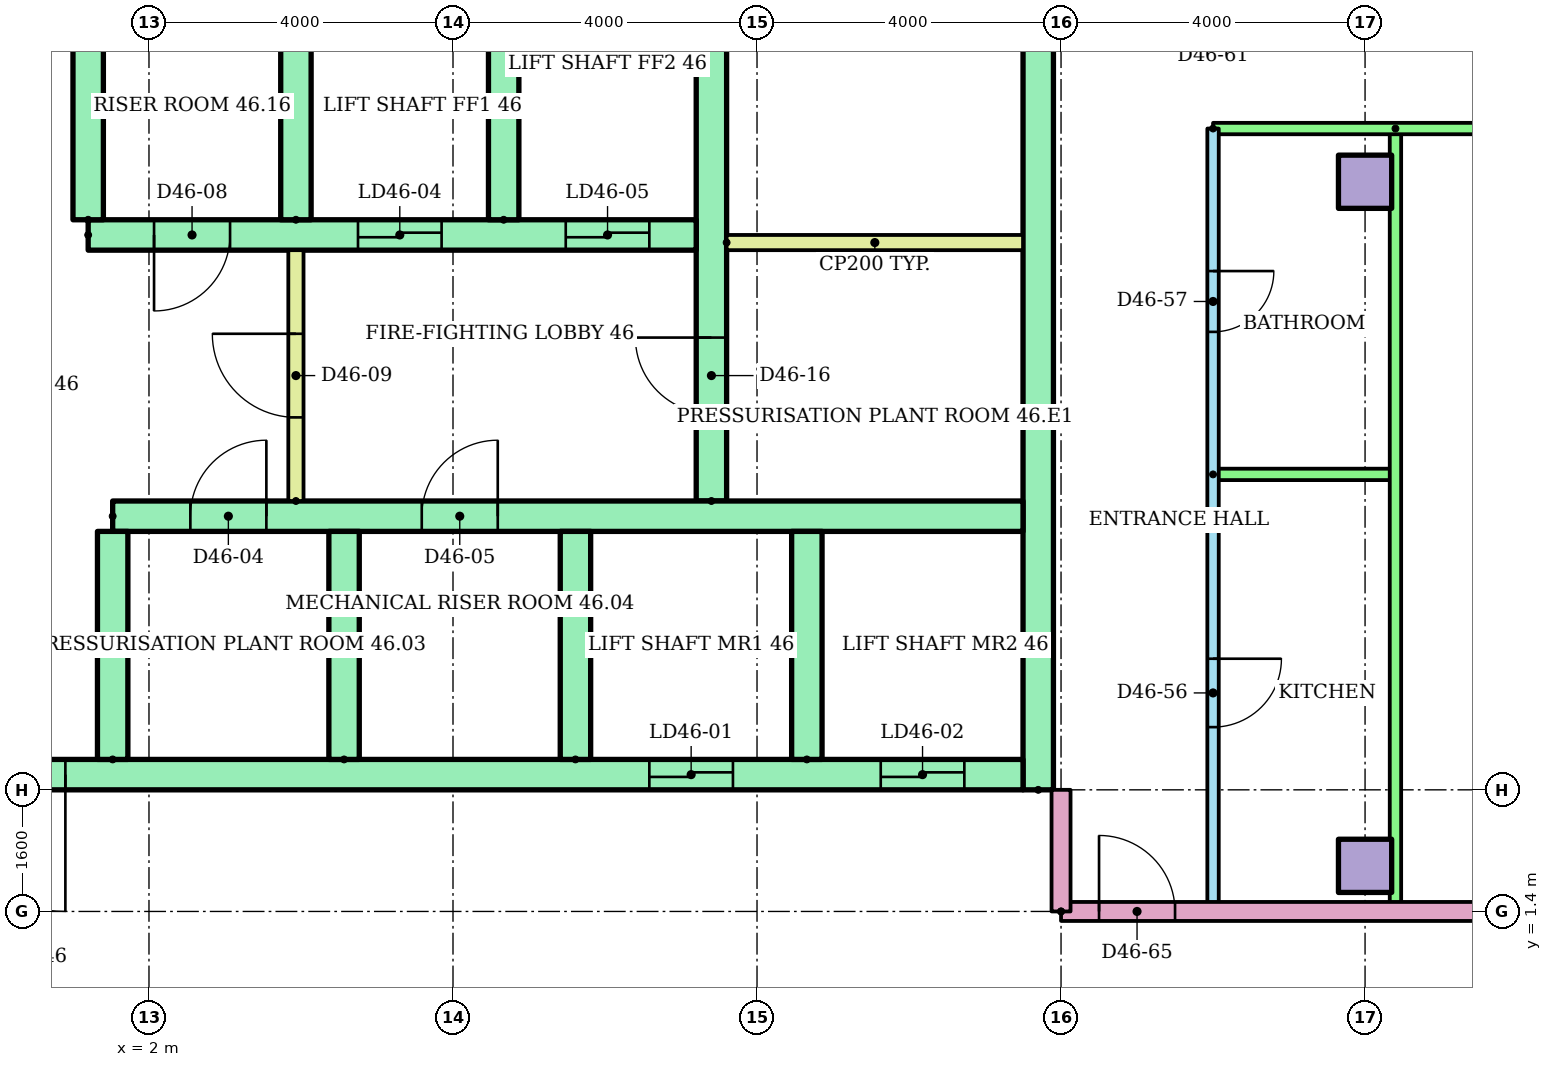
"""IFC4 building model, lengths in metres.
Left out: names, types, materials, properties, quantities, classifications, styles, units other than length and angle.
Written with IfcOpenShell. Run it as: python <this file> out.ifc"""

import sys

from ifc_helpers import new_model, si_unit, direction, frame, frame_2d, origin, origin_2d, place, context, subcontext, project, spatial, rectangle, extrude, element, fill, save


model = new_model("IFC4")
c1 = context("Model", 3, precision=1e-05, world=origin(), true_north=direction((0.0, 1.0)))
c2 = subcontext(c1, "Body", "Model", "MODEL_VIEW")
j1 = project(units=[si_unit("LENGTHUNIT", "METRE"), si_unit("PLANEANGLEUNIT", "RADIAN")], contexts=[c1])
p1 = place(None, origin())
s1 = spatial("IfcSite", under=j1, at=p1, CompositionType="ELEMENT")
p2 = place(p1, origin())
s2 = spatial("IfcBuilding", under=s1, at=p2, CompositionType="ELEMENT")
p3 = place(p2, frame((0.0, 0.0, 178.1)))
s3 = spatial("IfcBuildingStorey", under=s2, at=p3, CompositionType="ELEMENT", Elevation=178.1)
for number, where in (
    (1, (18.0, 2.0, 0.0)),
    (2, (18.0, 11.0, 0.0)),
):
    element("IfcColumn", number, at=place(p3, frame(where)), inside=s3, PredefinedType="COLUMN", context=c2, shape_type="SweptSolid", body=[
        extrude(rectangle(XDim=0.7, YDim=0.7, at=origin_2d()), origin(), (0.0, 0.0, 1.0), 3.2),
    ])
p4 = place(p3, frame((13.7, 3.0, 0.0), z_axis=(0.0, 0.0, 1.0), x_axis=(0.0, 1.0, 0.0)))
e3 = element("IfcWall", 3, at=p4, inside=s3, PredefinedType="SHEAR", context=c2, shape_type="SweptSolid", body=[
    extrude(rectangle(XDim=17.0, YDim=0.4, at=frame_2d((8.5, 0.0))), origin(), (0.0, 0.0, 1.0), 2.92),
])
p5 = place(p3, frame((9.4, 6.8, 0.0), z_axis=(0.0, 0.0, 1.0), x_axis=(0.0, 1.0, 0.0)))
e4 = element("IfcWall", 4, at=p5, inside=s3, PredefinedType="SHEAR", context=c2, shape_type="SweptSolid", body=[
    extrude(rectangle(XDim=12.7, YDim=0.4, at=frame_2d((6.35, 0.0))), origin(), (0.0, 0.0, 1.0), 2.92),
])
p6 = place(p5, frame((1.15, 0.0, 0.0)))
e5 = element("IfcOpeningElement", 5, at=p6, cuts=e4, PredefinedType="OPENING", context=c2, shape_type="SweptSolid", body=[
    extrude(rectangle(XDim=1.0, YDim=2.1, at=frame_2d((0.5, 1.05))), frame((0.0, 0.21, 0.0), z_axis=(0.0, -1.0, 0.0), x_axis=(1.0, 0.0, 0.0)), (0.0, 0.0, 1.0), 0.42),
])
p7 = place(p5, frame((7.925, 0.0, 0.0)))
e6 = element("IfcOpeningElement", 6, at=p7, cuts=e4, PredefinedType="OPENING", context=c2, shape_type="SweptSolid", body=[
    extrude(rectangle(XDim=1.0, YDim=2.1, at=frame_2d((0.5, 1.05))), frame((0.0, 0.21, 0.0), z_axis=(0.0, -1.0, 0.0), x_axis=(1.0, 0.0, 0.0)), (0.0, 0.0, 1.0), 0.42),
])
p8 = place(p3, frame((-13.5, 3.2, 0.0)))
e7 = element("IfcWall", 7, at=p8, inside=s3, PredefinedType="SHEAR", context=c2, shape_type="SweptSolid", body=[
    extrude(rectangle(XDim=27.0, YDim=0.4, at=frame_2d((13.5, 0.0))), origin(), (0.0, 0.0, 1.0), 2.92),
])
p9 = place(p8, frame((22.083, 0.0, 0.0)))
e8 = element("IfcOpeningElement", 8, at=p9, cuts=e7, PredefinedType="OPENING", context=c2, shape_type="SweptSolid", body=[
    extrude(rectangle(XDim=1.1, YDim=2.1, at=frame_2d((0.55, 1.05))), frame((0.0, 0.21, 0.0), z_axis=(0.0, -1.0, 0.0), x_axis=(1.0, 0.0, 0.0)), (0.0, 0.0, 1.0), 0.42),
])
p10 = place(p8, frame((25.128, 0.0, 0.0)))
e9 = element("IfcOpeningElement", 9, at=p10, cuts=e7, PredefinedType="OPENING", context=c2, shape_type="SweptSolid", body=[
    extrude(rectangle(XDim=1.1, YDim=2.1, at=frame_2d((0.55, 1.05))), frame((0.0, 0.21, 0.0), z_axis=(0.0, -1.0, 0.0), x_axis=(1.0, 0.0, 0.0)), (0.0, 0.0, 1.0), 0.42),
])
p11 = place(p8, frame((12.6, 0.0, 0.0)))
e10 = element("IfcOpeningElement", 10, at=p11, cuts=e7, PredefinedType="OPENING", context=c2, shape_type="SweptSolid", body=[
    extrude(rectangle(XDim=1.8, YDim=2.1, at=frame_2d((0.9, 1.05))), frame((0.0, 0.21, 0.0), z_axis=(0.0, -1.0, 0.0), x_axis=(1.0, 0.0, 0.0)), (0.0, 0.0, 1.0), 0.42),
])
p12 = place(p3, frame((1.522, 6.6, 0.0)))
e11 = element("IfcWall", 11, at=p12, inside=s3, PredefinedType="SHEAR", context=c2, shape_type="SweptSolid", body=[
    extrude(rectangle(XDim=11.978, YDim=0.4, at=frame_2d((5.989, 0.0))), origin(), (0.0, 0.0, 1.0), 2.92),
])
p13 = place(p12, frame((1.022, 0.0, 0.0)))
e12 = element("IfcOpeningElement", 12, at=p13, cuts=e11, PredefinedType="OPENING", context=c2, shape_type="SweptSolid", body=[
    extrude(rectangle(XDim=1.0, YDim=2.1, at=frame_2d((0.5, 1.05))), frame((0.0, 0.21, 0.0), z_axis=(0.0, -1.0, 0.0), x_axis=(1.0, 0.0, 0.0)), (0.0, 0.0, 1.0), 0.42),
])
p14 = place(p12, frame((4.067, 0.0, 0.0)))
e13 = element("IfcOpeningElement", 13, at=p14, cuts=e11, PredefinedType="OPENING", context=c2, shape_type="SweptSolid", body=[
    extrude(rectangle(XDim=1.0, YDim=2.1, at=frame_2d((0.5, 1.05))), frame((0.0, 0.21, 0.0), z_axis=(0.0, -1.0, 0.0), x_axis=(1.0, 0.0, 0.0)), (0.0, 0.0, 1.0), 0.42),
])
for number, where, z_axis, x_axis in (
    (14, (1.522, 3.4, 0.0), (0.0, 0.0, 1.0), (0.0, 1.0, 0.0)),
    (15, (4.567, 3.4, 0.0), (0.0, 0.0, 1.0), (0.0, 1.0, 0.0)),
    (16, (7.611, 3.4, 0.0), (0.0, 0.0, 1.0), (0.0, 1.0, 0.0)),
    (17, (10.656, 3.4, 0.0), (0.0, 0.0, 1.0), (0.0, 1.0, 0.0)),
):
    element("IfcWall", number, at=place(p3, frame(where, z_axis=z_axis, x_axis=x_axis)), inside=s3, PredefinedType="SHEAR", context=c2, shape_type="SweptSolid", body=[
        extrude(rectangle(XDim=3.0, YDim=0.4, at=frame_2d((1.5, 0.0))), origin(), (0.0, 0.0, 1.0), 2.92),
    ])
p15 = place(p3, frame((1.2, 10.3, 0.0)))
e18 = element("IfcWall", 18, at=p15, inside=s3, PredefinedType="SHEAR", context=c2, shape_type="SweptSolid", body=[
    extrude(rectangle(XDim=8.0, YDim=0.4, at=frame_2d((4.0, 0.0))), origin(), (0.0, 0.0, 1.0), 2.92),
])
p16 = place(p15, frame((3.55, 0.0, 0.0)))
e19 = element("IfcOpeningElement", 19, at=p16, cuts=e18, PredefinedType="OPENING", context=c2, shape_type="SweptSolid", body=[
    extrude(rectangle(XDim=1.1, YDim=2.1, at=frame_2d((0.55, 1.05))), frame((0.0, 0.21, 0.0), z_axis=(0.0, -1.0, 0.0), x_axis=(1.0, 0.0, 0.0)), (0.0, 0.0, 1.0), 0.42),
])
p17 = place(p15, frame((6.283, 0.0, 0.0)))
e20 = element("IfcOpeningElement", 20, at=p17, cuts=e18, PredefinedType="OPENING", context=c2, shape_type="SweptSolid", body=[
    extrude(rectangle(XDim=1.1, YDim=2.1, at=frame_2d((0.55, 1.05))), frame((0.0, 0.21, 0.0), z_axis=(0.0, -1.0, 0.0), x_axis=(1.0, 0.0, 0.0)), (0.0, 0.0, 1.0), 0.42),
])
p18 = place(p15, frame((0.867, 0.0, 0.0)))
e21 = element("IfcOpeningElement", 21, at=p18, cuts=e18, PredefinedType="OPENING", context=c2, shape_type="SweptSolid", body=[
    extrude(rectangle(XDim=1.0, YDim=2.1, at=frame_2d((0.5, 1.05))), frame((0.0, 0.21, 0.0), z_axis=(0.0, -1.0, 0.0), x_axis=(1.0, 0.0, 0.0)), (0.0, 0.0, 1.0), 0.42),
])
for number, where, z_axis, x_axis in (
    (22, (1.2, 10.5, 0.0), (0.0, 0.0, 1.0), (0.0, 1.0, 0.0)),
    (23, (3.933, 10.5, 0.0), (0.0, 0.0, 1.0), (0.0, 1.0, 0.0)),
    (24, (6.667, 10.5, 0.0), (0.0, 0.0, 1.0), (0.0, 1.0, 0.0)),
):
    element("IfcWall", number, at=place(p3, frame(where, z_axis=z_axis, x_axis=x_axis)), inside=s3, PredefinedType="SHEAR", context=c2, shape_type="SweptSolid", body=[
        extrude(rectangle(XDim=3.0, YDim=0.4, at=frame_2d((1.5, 0.0))), origin(), (0.0, 0.0, 1.0), 2.92),
    ])
p19 = place(p3, frame((3.933, 6.8, 0.0), z_axis=(0.0, 0.0, 1.0), x_axis=(0.0, 1.0, 0.0)))
e25 = element("IfcWall", 25, at=p19, inside=s3, PredefinedType="PARTITIONING", context=c2, shape_type="SweptSolid", body=[
    extrude(rectangle(XDim=3.3, YDim=0.2, at=frame_2d((1.65, 0.0))), origin(), (0.0, 0.0, 1.0), 2.92),
])
p20 = place(p19, frame((1.1, 0.0, 0.0)))
e26 = element("IfcOpeningElement", 26, at=p20, cuts=e25, PredefinedType="OPENING", context=c2, shape_type="SweptSolid", body=[
    extrude(rectangle(XDim=1.1, YDim=2.1, at=frame_2d((0.55, 1.05))), frame((0.0, 0.11, 0.0), z_axis=(0.0, -1.0, 0.0), x_axis=(1.0, 0.0, 0.0)), (0.0, 0.0, 1.0), 0.22),
])
p21 = place(p3, frame((9.6, 10.2, 0.0)))
e27 = element("IfcWall", 27, at=p21, inside=s3, PredefinedType="PARTITIONING", context=c2, shape_type="SweptSolid", body=[
    extrude(rectangle(XDim=3.9, YDim=0.2, at=frame_2d((1.95, 0.0))), origin(), (0.0, 0.0, 1.0), 2.92),
])
p22 = place(p3, frame((16.0, 11.7, 0.0), z_axis=(0.0, 0.0, 1.0), x_axis=(0.0, -1.0, 0.0)))
e28 = element("IfcWall", 28, at=p22, inside=s3, PredefinedType="PARTITIONING", context=c2, shape_type="SweptSolid", body=[
    extrude(rectangle(XDim=10.3, YDim=0.15, at=frame_2d((5.15, 0.0))), origin(), (0.0, 0.0, 1.0), 2.4),
])
p23 = place(p22, frame((6.975, 0.0, 0.0)))
e29 = element("IfcOpeningElement", 29, at=p23, cuts=e28, PredefinedType="OPENING", context=c2, shape_type="SweptSolid", body=[
    extrude(rectangle(XDim=0.9, YDim=2.1, at=frame_2d((0.45, 1.05))), frame((0.0, 0.085, 0.0), z_axis=(0.0, -1.0, 0.0), x_axis=(1.0, 0.0, 0.0)), (0.0, 0.0, 1.0), 0.17),
])
p24 = place(p22, frame((1.875, 0.0, 0.0)))
e30 = element("IfcOpeningElement", 30, at=p24, cuts=e28, PredefinedType="OPENING", context=c2, shape_type="SweptSolid", body=[
    extrude(rectangle(XDim=0.8, YDim=2.1, at=frame_2d((0.4, 1.05))), frame((0.0, 0.085, 0.0), z_axis=(0.0, -1.0, 0.0), x_axis=(1.0, 0.0, 0.0)), (0.0, 0.0, 1.0), 0.17),
])
p25 = place(p3, frame((16.0, 7.15, 0.0)))
e31 = element("IfcWall", 31, at=p25, inside=s3, PredefinedType="PARTITIONING", context=c2, shape_type="SweptSolid", body=[
    extrude(rectangle(XDim=2.4, YDim=0.15, at=frame_2d((1.2, 0.0))), origin(), (0.0, 0.0, 1.0), 2.4),
])
p26 = place(p3, frame((18.4, 11.7, 0.0), z_axis=(0.0, 0.0, 1.0), x_axis=(0.0, -1.0, 0.0)))
e32 = element("IfcWall", 32, at=p26, inside=s3, PredefinedType="PARTITIONING", context=c2, shape_type="SweptSolid", body=[
    extrude(rectangle(XDim=10.3, YDim=0.15, at=frame_2d((5.15, 0.0))), origin(), (0.0, 0.0, 1.0), 2.4),
])
p27 = place(p3, frame((36.82, 11.7, 0.0), z_axis=(0.0, 0.0, 1.0), x_axis=(-1.0, 0.0, 0.0)))
e33 = element("IfcWall", 33, at=p27, inside=s3, PredefinedType="PARTITIONING", context=c2, shape_type="SweptSolid", body=[
    extrude(rectangle(XDim=20.82, YDim=0.15, at=frame_2d((10.41, 0.0))), origin(), (0.0, 0.0, 1.0), 2.4),
])
p28 = place(p27, frame((14.095, 0.0, 0.0)))
e34 = element("IfcOpeningElement", 34, at=p28, cuts=e33, PredefinedType="OPENING", context=c2, shape_type="SweptSolid", body=[
    extrude(rectangle(XDim=0.9, YDim=2.1, at=frame_2d((0.45, 1.05))), frame((0.0, 0.085, 0.0), z_axis=(0.0, -1.0, 0.0), x_axis=(1.0, 0.0, 0.0)), (0.0, 0.0, 1.0), 0.17),
])
p29 = place(p27, frame((7.22, 0.0, 0.0)))
e35 = element("IfcOpeningElement", 35, at=p29, cuts=e33, PredefinedType="OPENING", context=c2, shape_type="SweptSolid", body=[
    extrude(rectangle(XDim=0.9, YDim=2.1, at=frame_2d((0.45, 1.05))), frame((0.0, 0.085, 0.0), z_axis=(0.0, -1.0, 0.0), x_axis=(1.0, 0.0, 0.0)), (0.0, 0.0, 1.0), 0.17),
])
p30 = place(p27, frame((1.373, 0.0, 0.0)))
e36 = element("IfcOpeningElement", 36, at=p30, cuts=e33, PredefinedType="OPENING", context=c2, shape_type="SweptSolid", body=[
    extrude(rectangle(XDim=0.9, YDim=2.1, at=frame_2d((0.45, 1.05))), frame((0.0, 0.085, 0.0), z_axis=(0.0, -1.0, 0.0), x_axis=(1.0, 0.0, 0.0)), (0.0, 0.0, 1.0), 0.17),
])
p31 = place(p3, frame((14.0, 1.4, 0.0)))
e37 = element("IfcWall", 37, at=p31, inside=s3, PredefinedType="PARTITIONING", context=c2, shape_type="SweptSolid", body=[
    extrude(rectangle(XDim=15.0, YDim=0.25, at=frame_2d((7.5, 0.0))), origin(), (0.0, 0.0, 1.0), 2.4),
])
p32 = place(p31, frame((0.5, 0.0, 0.0)))
e38 = element("IfcOpeningElement", 38, at=p32, cuts=e37, PredefinedType="OPENING", context=c2, shape_type="SweptSolid", body=[
    extrude(rectangle(XDim=1.0, YDim=2.1, at=frame_2d((0.5, 1.05))), frame((0.0, 0.135, 0.0), z_axis=(0.0, -1.0, 0.0), x_axis=(1.0, 0.0, 0.0)), (0.0, 0.0, 1.0), 0.27),
])
p33 = place(p3, frame((14.0, 1.4, 0.0), z_axis=(0.0, 0.0, 1.0), x_axis=(0.0, 1.0, 0.0)))
e39 = element("IfcWall", 39, at=p33, inside=s3, PredefinedType="PARTITIONING", context=c2, shape_type="SweptSolid", body=[
    extrude(rectangle(XDim=1.6, YDim=0.25, at=frame_2d((0.8, 0.0))), origin(), (0.0, 0.0, 1.0), 2.4),
])
p34 = place(p9, origin())
e40 = element("IfcDoor", 40, at=p34, inside=s3, OperationType="SLIDING_TO_LEFT", PredefinedType="DOOR", context=c2, shape_type="SweptSolid", body=[
    extrude(rectangle(XDim=1.1, YDim=2.1, at=frame_2d((0.55, 1.05))), frame((0.0, 0.025, 0.0), z_axis=(0.0, -1.0, 0.0), x_axis=(1.0, 0.0, 0.0)), (0.0, 0.0, 1.0), 0.05),
])
fill(e8, e40)
p35 = place(p10, origin())
e41 = element("IfcDoor", 41, at=p35, inside=s3, OperationType="SLIDING_TO_LEFT", PredefinedType="DOOR", context=c2, shape_type="SweptSolid", body=[
    extrude(rectangle(XDim=1.1, YDim=2.1, at=frame_2d((0.55, 1.05))), frame((0.0, 0.025, 0.0), z_axis=(0.0, -1.0, 0.0), x_axis=(1.0, 0.0, 0.0)), (0.0, 0.0, 1.0), 0.05),
])
fill(e9, e41)
p36 = place(p11, frame((1.8, 0.0, 0.0), z_axis=(0.0, 0.0, 1.0), x_axis=(-1.0, 0.0, 0.0)))
e42 = element("IfcDoor", 42, at=p36, inside=s3, OperationType="DOUBLE_DOOR_SINGLE_SWING", PredefinedType="DOOR", context=c2, shape_type="SweptSolid", body=[
    extrude(rectangle(XDim=1.8, YDim=2.1, at=frame_2d((0.9, 1.05))), frame((0.0, 0.025, 0.0), z_axis=(0.0, -1.0, 0.0), x_axis=(1.0, 0.0, 0.0)), (0.0, 0.0, 1.0), 0.05),
])
fill(e10, e42)
p37 = place(p13, origin())
e43 = element("IfcDoor", 43, at=p37, inside=s3, OperationType="SINGLE_SWING_RIGHT", PredefinedType="DOOR", context=c2, shape_type="SweptSolid", body=[
    extrude(rectangle(XDim=1.0, YDim=2.1, at=frame_2d((0.5, 1.05))), frame((0.0, 0.025, 0.0), z_axis=(0.0, -1.0, 0.0), x_axis=(1.0, 0.0, 0.0)), (0.0, 0.0, 1.0), 0.05),
])
fill(e12, e43)
p38 = place(p14, origin())
e44 = element("IfcDoor", 44, at=p38, inside=s3, OperationType="SINGLE_SWING_RIGHT", PredefinedType="DOOR", context=c2, shape_type="SweptSolid", body=[
    extrude(rectangle(XDim=1.0, YDim=2.1, at=frame_2d((0.5, 1.05))), frame((0.0, 0.025, 0.0), z_axis=(0.0, -1.0, 0.0), x_axis=(1.0, 0.0, 0.0)), (0.0, 0.0, 1.0), 0.05),
])
fill(e13, e44)
p39 = place(p16, origin())
e45 = element("IfcDoor", 45, at=p39, inside=s3, OperationType="SLIDING_TO_LEFT", PredefinedType="DOOR", context=c2, shape_type="SweptSolid", body=[
    extrude(rectangle(XDim=1.1, YDim=2.1, at=frame_2d((0.55, 1.05))), frame((0.0, 0.025, 0.0), z_axis=(0.0, -1.0, 0.0), x_axis=(1.0, 0.0, 0.0)), (0.0, 0.0, 1.0), 0.05),
])
fill(e19, e45)
p40 = place(p17, origin())
e46 = element("IfcDoor", 46, at=p40, inside=s3, OperationType="SLIDING_TO_LEFT", PredefinedType="DOOR", context=c2, shape_type="SweptSolid", body=[
    extrude(rectangle(XDim=1.1, YDim=2.1, at=frame_2d((0.55, 1.05))), frame((0.0, 0.025, 0.0), z_axis=(0.0, -1.0, 0.0), x_axis=(1.0, 0.0, 0.0)), (0.0, 0.0, 1.0), 0.05),
])
fill(e20, e46)
p41 = place(p18, frame((1.0, 0.0, 0.0), z_axis=(0.0, 0.0, 1.0), x_axis=(-1.0, 0.0, 0.0)))
e47 = element("IfcDoor", 47, at=p41, inside=s3, OperationType="SINGLE_SWING_LEFT", PredefinedType="DOOR", context=c2, shape_type="SweptSolid", body=[
    extrude(rectangle(XDim=1.0, YDim=2.1, at=frame_2d((0.5, 1.05))), frame((0.0, 0.025, 0.0), z_axis=(0.0, -1.0, 0.0), x_axis=(1.0, 0.0, 0.0)), (0.0, 0.0, 1.0), 0.05),
])
fill(e21, e47)
p42 = place(p20, origin())
e48 = element("IfcDoor", 48, at=p42, inside=s3, OperationType="SINGLE_SWING_RIGHT", PredefinedType="DOOR", context=c2, shape_type="SweptSolid", body=[
    extrude(rectangle(XDim=1.1, YDim=2.1, at=frame_2d((0.55, 1.05))), frame((0.0, 0.025, 0.0), z_axis=(0.0, -1.0, 0.0), x_axis=(1.0, 0.0, 0.0)), (0.0, 0.0, 1.0), 0.05),
])
fill(e26, e48)
p43 = place(p6, origin())
e49 = element("IfcDoor", 49, at=p43, inside=s3, OperationType="SINGLE_SWING_RIGHT", PredefinedType="DOOR", context=c2, shape_type="SweptSolid", body=[
    extrude(rectangle(XDim=1.0, YDim=2.1, at=frame_2d((0.5, 1.05))), frame((0.0, 0.025, 0.0), z_axis=(0.0, -1.0, 0.0), x_axis=(1.0, 0.0, 0.0)), (0.0, 0.0, 1.0), 0.05),
])
fill(e5, e49)
p44 = place(p23, origin())
e50 = element("IfcDoor", 50, at=p44, inside=s3, OperationType="SINGLE_SWING_LEFT", PredefinedType="DOOR", context=c2, shape_type="SweptSolid", body=[
    extrude(rectangle(XDim=0.9, YDim=2.1, at=frame_2d((0.45, 1.05))), frame((0.0, 0.025, 0.0), z_axis=(0.0, -1.0, 0.0), x_axis=(1.0, 0.0, 0.0)), (0.0, 0.0, 1.0), 0.05),
])
fill(e29, e50)
p45 = place(p24, origin())
e51 = element("IfcDoor", 51, at=p45, inside=s3, OperationType="SINGLE_SWING_LEFT", PredefinedType="DOOR", context=c2, shape_type="SweptSolid", body=[
    extrude(rectangle(XDim=0.8, YDim=2.1, at=frame_2d((0.4, 1.05))), frame((0.0, 0.025, 0.0), z_axis=(0.0, -1.0, 0.0), x_axis=(1.0, 0.0, 0.0)), (0.0, 0.0, 1.0), 0.05),
])
fill(e30, e51)
p46 = place(p32, origin())
e52 = element("IfcDoor", 52, at=p46, inside=s3, OperationType="SINGLE_SWING_LEFT", PredefinedType="DOOR", context=c2, shape_type="SweptSolid", body=[
    extrude(rectangle(XDim=1.0, YDim=2.1, at=frame_2d((0.5, 1.05))), frame((0.0, 0.025, 0.0), z_axis=(0.0, -1.0, 0.0), x_axis=(1.0, 0.0, 0.0)), (0.0, 0.0, 1.0), 0.05),
])
fill(e38, e52)
save(model, sys.argv[1])
